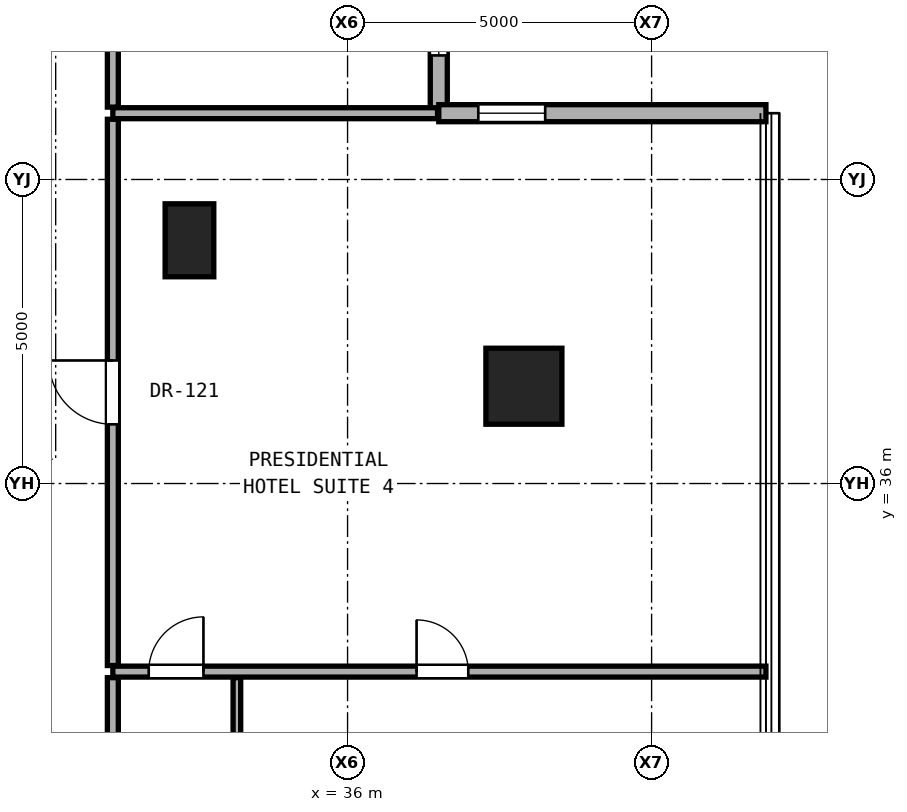
"""IFC4 building model, lengths in metres.
Left out: names, types, materials, properties, quantities, classifications, styles, units other than length and angle.
Written with IfcOpenShell. Run it as: python <this file> out.ifc"""

import sys

from ifc_helpers import new_model, si_unit, direction, frame, frame_2d, origin, origin_2d, place, context, subcontext, project, spatial, rectangle, hollow_rectangle, extrude, element, fill, save


model = new_model("IFC4")
c1 = context("Model", 3, precision=1e-05, world=origin(), true_north=direction((0.0, 1.0)))
c2 = subcontext(c1, "Body", "Model", "MODEL_VIEW")
j1 = project(units=[si_unit("LENGTHUNIT", "METRE"), si_unit("PLANEANGLEUNIT", "RADIAN")], contexts=[c1])
p1 = place(None, origin())
s1 = spatial("IfcSite", under=j1, at=p1, CompositionType="ELEMENT")
p2 = place(p1, origin())
s2 = spatial("IfcBuilding", under=s1, at=p2, CompositionType="ELEMENT")
p3 = place(p2, frame((0.0, 0.0, 38.9)))
s3 = spatial("IfcBuildingStorey", under=s2, at=p3, CompositionType="ELEMENT", Elevation=38.9)
p4 = place(p3, frame((38.9, 37.6, 0.0), z_axis=(0.0, 0.0, 1.0), x_axis=(1.0, 0.0, 0.0)))
e1 = element("IfcColumn", 1, at=p4, inside=s3, PredefinedType="COLUMN", context=c2, shape_type="SweptSolid", body=[
    extrude(hollow_rectangle(XDim=1.25, YDim=1.25, WallThickness=0.07, at=origin_2d()), origin(), (0.0, 0.0, 1.0), 3.3),
])
p5 = place(p3, frame((33.4, 40.0, 0.0), z_axis=(0.0, 0.0, 1.0), x_axis=(1.0, 0.0, 0.0)))
e2 = element("IfcColumn", 2, at=p5, inside=s3, PredefinedType="PILASTER", context=c2, shape_type="SweptSolid", body=[
    extrude(rectangle(XDim=0.8, YDim=1.2, at=origin_2d()), origin(), (0.0, 0.0, 1.0), 3.3),
])
p6 = place(p3, frame((37.5, 42.09, 0.0), z_axis=(0.0, 0.0, 1.0), x_axis=(0.0, 1.0, 0.0)))
e3 = element("IfcWall", 3, at=p6, inside=s3, PredefinedType="SOLIDWALL", context=c2, shape_type="SweptSolid", body=[
    extrude(rectangle(XDim=5.38, YDim=0.28, at=frame_2d((2.69, 0.0))), origin(), (0.0, 0.0, 1.0), 3.04),
])
p7 = place(p6, frame((0.95, 0.0, 0.85)))
e4 = element("IfcOpeningElement", 4, at=p7, cuts=e3, PredefinedType="OPENING", context=c2, shape_type="SweptSolid", body=[
    extrude(rectangle(XDim=1.1, YDim=2.0, at=frame_2d((0.55, 1.0))), frame((0.0, 0.15, 0.0), z_axis=(0.0, -1.0, 0.0), x_axis=(1.0, 0.0, 0.0)), (0.0, 0.0, 1.0), 0.3),
])
p8 = place(p3, frame((42.88, 42.09, 0.0), z_axis=(0.0, 0.0, 1.0), x_axis=(-1.0, 0.0, 0.0)))
e5 = element("IfcWall", 5, at=p8, inside=s3, PredefinedType="SOLIDWALL", context=c2, shape_type="SweptSolid", body=[
    extrude(rectangle(XDim=5.38, YDim=0.28, at=frame_2d((2.69, 0.0))), origin(), (0.0, 0.0, 1.0), 3.04),
])
p9 = place(p8, frame((3.63, 0.0, 0.85)))
e6 = element("IfcOpeningElement", 6, at=p9, cuts=e5, PredefinedType="OPENING", context=c2, shape_type="SweptSolid", body=[
    extrude(rectangle(XDim=1.1, YDim=2.0, at=frame_2d((0.55, 1.0))), frame((0.0, 0.15, 0.0), z_axis=(0.0, -1.0, 0.0), x_axis=(1.0, 0.0, 0.0)), (0.0, 0.0, 1.0), 0.3),
])
p10 = place(p3, frame((32.14, 32.907, 0.0), z_axis=(0.0, 0.0, 1.0), x_axis=(1.0, 0.0, 0.0)))
e7 = element("IfcWall", 7, at=p10, inside=s3, PredefinedType="PARTITIONING", context=c2, shape_type="SweptSolid", body=[
    extrude(rectangle(XDim=10.74, YDim=0.18, at=frame_2d((5.37, 0.0))), origin(), (0.0, 0.0, 1.0), 2.125),
])
p11 = place(p10, frame((4.995, 0.0, 0.0)))
e8 = element("IfcOpeningElement", 8, at=p11, cuts=e7, PredefinedType="OPENING", context=c2, shape_type="SweptSolid", body=[
    extrude(rectangle(XDim=0.85, YDim=2.01, at=frame_2d((0.425, 1.005))), frame((0.0, 0.1, 0.0), z_axis=(0.0, -1.0, 0.0), x_axis=(1.0, 0.0, 0.0)), (0.0, 0.0, 1.0), 0.2),
])
p12 = place(p10, frame((0.59, 0.0, 0.0)))
e9 = element("IfcOpeningElement", 9, at=p12, cuts=e7, PredefinedType="OPENING", context=c2, shape_type="SweptSolid", body=[
    extrude(rectangle(XDim=0.9, YDim=2.1, at=frame_2d((0.45, 1.05))), frame((0.0, 0.1, 0.0), z_axis=(0.0, -1.0, 0.0), x_axis=(1.0, 0.0, 0.0)), (0.0, 0.0, 1.0), 0.2),
])
p13 = place(p3, frame((32.14, 42.09, 0.0), z_axis=(0.0, 0.0, 1.0), x_axis=(1.0, 0.0, 0.0)))
e10 = element("IfcWall", 10, at=p13, inside=s3, PredefinedType="PARTITIONING", context=c2, shape_type="SweptSolid", body=[
    extrude(rectangle(XDim=5.34, YDim=0.18, at=frame_2d((2.67, 0.0))), origin(), (0.0, 0.0, 1.0), 3.06),
])
p14 = place(p3, frame((32.14, 30.26, 0.0), z_axis=(0.0, 0.0, 1.0), x_axis=(0.0, 1.0, 0.0)))
e11 = element("IfcWall", 11, at=p14, inside=s3, PredefinedType="PARTITIONING", context=c2, shape_type="SweptSolid", body=[
    extrude(rectangle(XDim=2.547, YDim=0.18, at=frame_2d((1.274, 0.0))), origin(), (0.0, 0.0, 1.0), 2.279),
])
p15 = place(p3, frame((32.14, 33.007, 0.0), z_axis=(0.0, 0.0, 1.0), x_axis=(0.0, 1.0, 0.0)))
e12 = element("IfcWall", 12, at=p15, inside=s3, PredefinedType="PARTITIONING", context=c2, shape_type="SweptSolid", body=[
    extrude(rectangle(XDim=8.983, YDim=0.18, at=frame_2d((4.491, 0.0))), origin(), (0.0, 0.0, 1.0), 2.436),
])
p16 = place(p15, frame((3.967, 0.0, 0.0)))
e13 = element("IfcOpeningElement", 13, at=p16, cuts=e12, PredefinedType="OPENING", context=c2, shape_type="SweptSolid", body=[
    extrude(rectangle(XDim=1.05, YDim=2.2, at=frame_2d((0.525, 1.1))), frame((0.0, 0.1, 0.0), z_axis=(0.0, -1.0, 0.0), x_axis=(1.0, 0.0, 0.0)), (0.0, 0.0, 1.0), 0.2),
])
p17 = place(p3, frame((32.14, 42.19, 0.0), z_axis=(0.0, 0.0, 1.0), x_axis=(0.0, 1.0, 0.0)))
e14 = element("IfcWall", 14, at=p17, inside=s3, PredefinedType="PARTITIONING", context=c2, shape_type="SweptSolid", body=[
    extrude(rectangle(XDim=5.28, YDim=0.18, at=frame_2d((2.64, 0.0))), origin(), (0.0, 0.0, 1.0), 3.06),
])
p18 = place(p17, frame((2.165, 0.0, 0.0)))
e15 = element("IfcOpeningElement", 15, at=p18, cuts=e14, PredefinedType="OPENING", context=c2, shape_type="SweptSolid", body=[
    extrude(rectangle(XDim=0.95, YDim=2.15, at=frame_2d((0.475, 1.075))), frame((0.0, 0.1, 0.0), z_axis=(0.0, -1.0, 0.0), x_axis=(1.0, 0.0, 0.0)), (0.0, 0.0, 1.0), 0.2),
])
p19 = place(p3, frame((34.18, 30.26, 0.0), z_axis=(0.0, 0.0, 1.0), x_axis=(0.0, 1.0, 0.0)))
e16 = element("IfcWall", 16, at=p19, inside=s3, PredefinedType="PARTITIONING", context=c2, shape_type="SweptSolid", body=[
    extrude(rectangle(XDim=2.547, YDim=0.125, at=frame_2d((1.274, 0.0))), origin(), (0.0, 0.0, 1.0), 2.279),
])
p20 = place(p7, origin())
e17 = element("IfcWindow", 17, at=p20, inside=s3, PartitioningType="SINGLE_PANEL", PredefinedType="WINDOW", context=c2, shape_type="SweptSolid", body=[
    extrude(rectangle(XDim=1.1, YDim=2.0, at=frame_2d((0.55, 1.0))), frame((0.0, 0.03, 0.0), z_axis=(0.0, -1.0, 0.0), x_axis=(1.0, 0.0, 0.0)), (0.0, 0.0, 1.0), 0.06),
])
fill(e4, e17)
p21 = place(p9, origin())
e18 = element("IfcWindow", 18, at=p21, inside=s3, PartitioningType="SINGLE_PANEL", PredefinedType="WINDOW", context=c2, shape_type="SweptSolid", body=[
    extrude(rectangle(XDim=1.1, YDim=2.0, at=frame_2d((0.55, 1.0))), frame((0.0, 0.03, 0.0), z_axis=(0.0, -1.0, 0.0), x_axis=(1.0, 0.0, 0.0)), (0.0, 0.0, 1.0), 0.06),
])
fill(e6, e18)
p22 = place(p16, origin())
e19 = element("IfcDoor", 19, at=p22, inside=s3, OperationType="SINGLE_SWING_RIGHT", PredefinedType="DOOR", context=c2, shape_type="SweptSolid", body=[
    extrude(rectangle(XDim=1.05, YDim=2.2, at=frame_2d((0.525, 1.1))), frame((0.0, 0.025, 0.0), z_axis=(0.0, -1.0, 0.0), x_axis=(1.0, 0.0, 0.0)), (0.0, 0.0, 1.0), 0.05),
])
fill(e13, e19)
p23 = place(p11, origin())
e20 = element("IfcDoor", 20, at=p23, inside=s3, OperationType="SINGLE_SWING_LEFT", PredefinedType="DOOR", context=c2, shape_type="SweptSolid", body=[
    extrude(rectangle(XDim=0.85, YDim=2.01, at=frame_2d((0.425, 1.005))), frame((0.0, 0.025, 0.0), z_axis=(0.0, -1.0, 0.0), x_axis=(1.0, 0.0, 0.0)), (0.0, 0.0, 1.0), 0.05),
])
fill(e8, e20)
p24 = place(p12, origin())
e21 = element("IfcDoor", 21, at=p24, inside=s3, OperationType="SINGLE_SWING_RIGHT", PredefinedType="DOOR", context=c2, shape_type="SweptSolid", body=[
    extrude(rectangle(XDim=0.9, YDim=2.1, at=frame_2d((0.45, 1.05))), frame((0.0, 0.025, 0.0), z_axis=(0.0, -1.0, 0.0), x_axis=(1.0, 0.0, 0.0)), (0.0, 0.0, 1.0), 0.05),
])
fill(e9, e21)
save(model, sys.argv[1])
